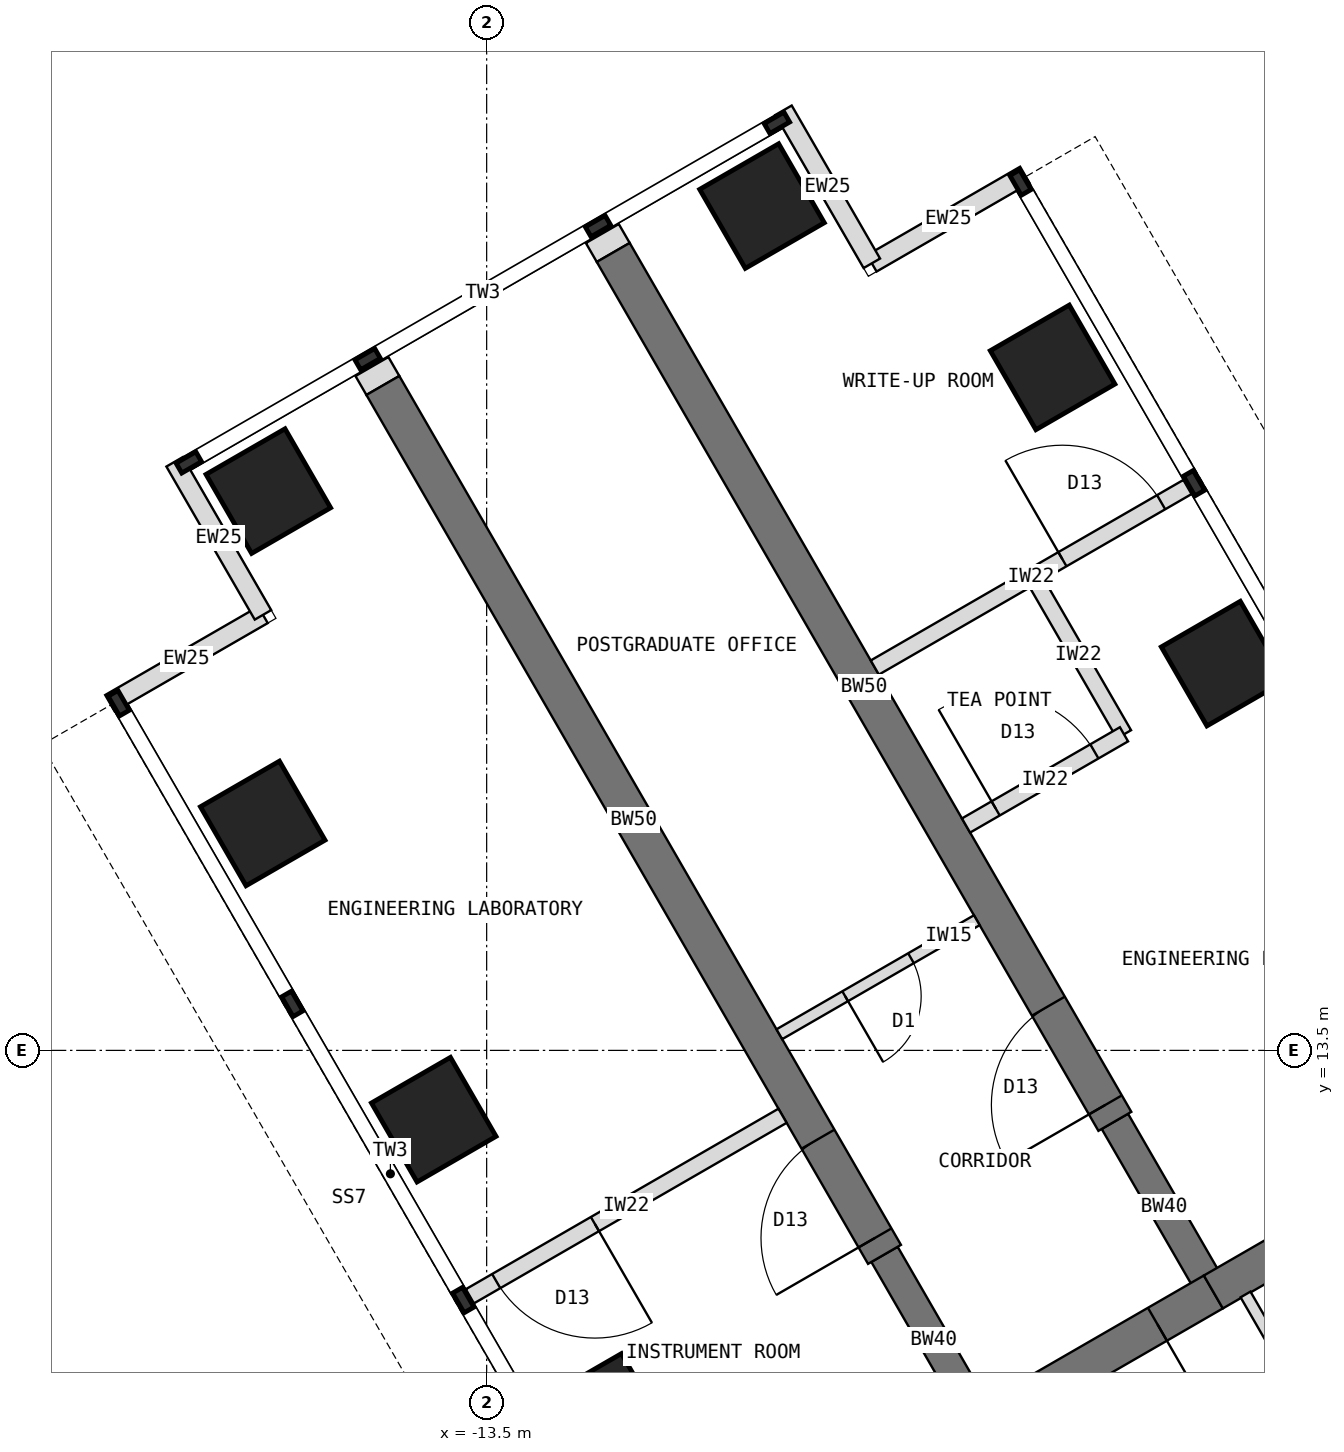
"""IFC4 building model, lengths in metres.
Left out: names, types, materials, properties, quantities, classifications, styles, units other than length and angle.
Written with IfcOpenShell. Run it as: python <this file> out.ifc"""

import sys

from ifc_helpers import new_model, si_unit, direction, frame, frame_2d, origin, origin_2d, place, context, subcontext, project, spatial, rectangle, extrude, element, fill, save


model = new_model("IFC4")
c1 = context("Model", 3, precision=1e-05, world=origin(), true_north=direction((0.0, 1.0)))
c2 = subcontext(c1, "Body", "Model", "MODEL_VIEW")
j1 = project(units=[si_unit("LENGTHUNIT", "METRE"), si_unit("PLANEANGLEUNIT", "RADIAN")], contexts=[c1])
p1 = place(None, origin())
s1 = spatial("IfcSite", under=j1, at=p1, CompositionType="ELEMENT")
p2 = place(p1, origin())
s2 = spatial("IfcBuilding", under=s1, at=p2, CompositionType="ELEMENT")
p3 = place(p2, frame((0.0, 0.0, 186.5)))
s3 = spatial("IfcBuildingStorey", under=s2, at=p3, CompositionType="ELEMENT", Elevation=186.5)
p4 = place(p3, frame((0.0, 12.596, 0.0), z_axis=(0.0, 0.0, 1.0), x_axis=(-0.866011268655, -0.500024481964, 0.0)))
e1 = element("IfcWall", 1, at=p4, inside=s3, PredefinedType="SHEAR", context=c2, shape_type="SweptSolid", body=[
    extrude(rectangle(XDim=4.548, YDim=0.5, at=frame_2d((2.274, 0.0))), origin(), (0.0, 0.0, 1.0), 4.0),
])
p5 = place(p3, frame((-3.939, 10.322, 0.0), z_axis=(0.0, 0.0, 1.0), x_axis=(-0.866019471182, -0.500010275428, 0.0)))
e2 = element("IfcWall", 2, at=p5, inside=s3, PredefinedType="SHEAR", context=c2, shape_type="SweptSolid", body=[
    extrude(rectangle(XDim=3.5, YDim=0.5, at=frame_2d((1.75, 0.0))), origin(), (0.0, 0.0, 1.0), 4.0),
])
p6 = place(p5, frame((0.85, 0.0, 0.0)))
e3 = element("IfcOpeningElement", 3, at=p6, cuts=e2, PredefinedType="OPENING", context=c2, shape_type="SweptSolid", body=[
    extrude(rectangle(XDim=1.8, YDim=2.1, at=frame_2d((0.9, 1.05))), frame((0.0, 0.26, 0.0), z_axis=(0.0, -1.0, 0.0), x_axis=(1.0, 0.0, 0.0)), (0.0, 0.0, 1.0), 0.52),
])
p7 = place(p3, frame((-6.97, 8.572, 0.0), z_axis=(0.0, 0.0, 1.0), x_axis=(-0.499988811324, 0.866031863473, 0.0)))
e4 = element("IfcWall", 4, at=p7, inside=s3, PredefinedType="SHEAR", context=c2, shape_type="SweptSolid", body=[
    extrude(rectangle(XDim=2.592, YDim=0.4, at=frame_2d((1.296, 0.0))), origin(), (0.0, 0.0, 1.0), 4.0),
])
p8 = place(p3, frame((-8.266, 10.816, 0.0), z_axis=(0.0, 0.0, 1.0), x_axis=(-0.499996231654, 0.866027579429, 0.0)))
e5 = element("IfcWall", 5, at=p8, inside=s3, PredefinedType="SHEAR", context=c2, shape_type="SweptSolid", body=[
    extrude(rectangle(XDim=13.2, YDim=0.5, at=frame_2d((6.6, 0.0))), origin(), (0.0, 0.0, 1.0), 4.0),
])
p9 = place(p8, frame((0.25, 0.0, 0.0)))
e6 = element("IfcOpeningElement", 6, at=p9, cuts=e5, PredefinedType="OPENING", context=c2, shape_type="SweptSolid", body=[
    extrude(rectangle(XDim=1.5, YDim=2.1, at=frame_2d((0.75, 1.05))), frame((0.0, 0.26, 0.0), z_axis=(0.0, -1.0, 0.0), x_axis=(1.0, 0.0, 0.0)), (0.0, 0.0, 1.0), 0.52),
])
p10 = place(p3, frame((-3.939, 10.322, 0.0), z_axis=(0.0, 0.0, 1.0), x_axis=(-0.499918158782, 0.866072649678, 0.0)))
e7 = element("IfcWall", 7, at=p10, inside=s3, PredefinedType="SHEAR", context=c2, shape_type="SweptSolid", body=[
    extrude(rectangle(XDim=2.592, YDim=0.4, at=frame_2d((1.296, 0.0))), origin(), (0.0, 0.0, 1.0), 4.0),
])
p11 = place(p3, frame((-5.234, 12.566, 0.0), z_axis=(0.0, 0.0, 1.0), x_axis=(-0.500010103361, 0.866019570528, 0.0)))
e8 = element("IfcWall", 8, at=p11, inside=s3, PredefinedType="SHEAR", context=c2, shape_type="SweptSolid", body=[
    extrude(rectangle(XDim=13.2, YDim=0.5, at=frame_2d((6.6, 0.0))), origin(), (0.0, 0.0, 1.0), 4.0),
])
p12 = place(p11, frame((0.25, 0.0, 0.0)))
e9 = element("IfcOpeningElement", 9, at=p12, cuts=e8, PredefinedType="OPENING", context=c2, shape_type="SweptSolid", body=[
    extrude(rectangle(XDim=1.5, YDim=2.1, at=frame_2d((0.75, 1.05))), frame((0.0, 0.26, 0.0), z_axis=(0.0, -1.0, 0.0), x_axis=(1.0, 0.0, 0.0)), (0.0, 0.0, 1.0), 0.52),
])
for number, where, z_axis, x_axis in (
    (10, (-11.946, 8.691, 0.0), (0.0, 0.0, 1.0), (0.866, 0.5, 0.0)),
    (11, (-14.196, 12.588, 0.0), (0.0, 0.0, 1.0), (0.866, 0.5, 0.0)),
    (12, (-3.804, 18.588, 0.0), (0.0, 0.0, 1.0), (0.866, 0.5, 0.0)),
    (13, (-16.446, 16.486, 0.0), (0.0, 0.0, 1.0), (0.866, 0.5, 0.0)),
    (14, (-6.054, 22.486, 0.0), (0.0, 0.0, 1.0), (0.866, 0.5, 0.0)),
    (15, (-16.373, 20.858, 0.0), (0.0, 0.0, 1.0), (0.866, 0.5, 0.0)),
    (16, (-9.877, 24.608, 0.0), (0.0, 0.0, 1.0), (0.866, 0.5, 0.0)),
):
    element("IfcColumn", number, at=place(p3, frame(where, z_axis=z_axis, x_axis=x_axis)), inside=s3, PredefinedType="COLUMN", context=c2, shape_type="SweptSolid", body=[
        extrude(rectangle(XDim=1.2, YDim=1.2, at=origin_2d()), origin(), (0.0, 0.0, 1.0), 4.0),
    ])
for number, where, z_axis, x_axis in (
    (17, (-18.456, 18.067, 0.0), (0.0, 0.0, 1.0), (0.866, 0.5, 0.0)),
    (18, (-16.443, 19.23, 0.0), (0.0, 0.0, 1.0), (-0.5, 0.866, 0.0)),
    (19, (-6.419, 25.017, 0.0), (0.0, 0.0, 1.0), (-0.866, -0.5, 0.0)),
    (20, (-8.432, 23.855, 0.0), (0.0, 0.0, 1.0), (-0.5, 0.866, 0.0)),
):
    element("IfcWall", number, at=place(p3, frame(where, z_axis=z_axis, x_axis=x_axis)), inside=s3, PredefinedType="STANDARD", context=c2, shape_type="SweptSolid", body=[
        extrude(rectangle(XDim=2.325, YDim=0.25, at=frame_2d((1.163, 0.0))), origin(), (0.0, 0.0, 1.0), 3.8),
    ])
for number, where, z_axis, x_axis in (
    (21, (-14.865, 22.248, 0.0), (0.0, 0.0, 1.0), (-0.5, 0.866, 0.0)),
    (22, (-11.834, 23.998, 0.0), (0.0, 0.0, 1.0), (-0.5, 0.866, 0.0)),
):
    element("IfcWall", number, at=place(p3, frame(where, z_axis=z_axis, x_axis=x_axis)), inside=s3, PredefinedType="PARTITIONING", context=c2, shape_type="SweptSolid", body=[
        extrude(rectangle(XDim=0.288, YDim=0.5, at=frame_2d((0.144, 0.0))), origin(), (0.0, 0.0, 1.0), 3.8),
    ])
p13 = place(p3, frame((-9.607, 12.64, 0.0), z_axis=(0.0, 0.0, 1.0), x_axis=(-0.866033238375, -0.499986429846, 0.0)))
e23 = element("IfcWall", 23, at=p13, inside=s3, PredefinedType="PARTITIONING", context=c2, shape_type="SweptSolid", body=[
    extrude(rectangle(XDim=4.75, YDim=0.215, at=frame_2d((2.375, 0.0))), origin(), (0.0, 0.0, 1.0), 3.8),
])
p14 = place(p13, frame((2.85, 0.0, 0.0)))
e24 = element("IfcOpeningElement", 24, at=p14, cuts=e23, PredefinedType="OPENING", context=c2, shape_type="SweptSolid", body=[
    extrude(rectangle(XDim=1.5, YDim=2.1, at=frame_2d((0.75, 1.05))), frame((0.0, 0.117, 0.0), z_axis=(0.0, -1.0, 0.0), x_axis=(1.0, 0.0, 0.0)), (0.0, 0.0, 1.0), 0.235),
])
p15 = place(p3, frame((-8.393, 18.537, 0.0), z_axis=(0.0, 0.0, 1.0), x_axis=(0.866033238375, 0.499986429846, 0.0)))
e25 = element("IfcWall", 25, at=p15, inside=s3, PredefinedType="PARTITIONING", context=c2, shape_type="SweptSolid", body=[
    extrude(rectangle(XDim=4.75, YDim=0.215, at=frame_2d((2.375, 0.0))), origin(), (0.0, 0.0, 1.0), 3.8),
])
p16 = place(p15, frame((2.85, 0.0, 0.0)))
e26 = element("IfcOpeningElement", 26, at=p16, cuts=e25, PredefinedType="OPENING", context=c2, shape_type="SweptSolid", body=[
    extrude(rectangle(XDim=1.5, YDim=2.1, at=frame_2d((0.75, 1.05))), frame((0.0, 0.117, 0.0), z_axis=(0.0, -1.0, 0.0), x_axis=(1.0, 0.0, 0.0)), (0.0, 0.0, 1.0), 0.235),
])
p17 = place(p3, frame((-5.115, 17.658, 0.0), z_axis=(0.0, 0.0, 1.0), x_axis=(-0.499957262057, 0.866050077142, 0.0)))
e27 = element("IfcWall", 27, at=p17, inside=s3, PredefinedType="PARTITIONING", context=c2, shape_type="SweptSolid", body=[
    extrude(rectangle(XDim=2.4, YDim=0.215, at=frame_2d((1.2, 0.0))), origin(), (0.0, 0.0, 1.0), 3.8),
])
p18 = place(p3, frame((-7.193, 16.458, 0.0), z_axis=(0.0, 0.0, 1.0), x_axis=(0.866024647952, 0.500001309137, 0.0)))
e28 = element("IfcWall", 28, at=p18, inside=s3, PredefinedType="PARTITIONING", context=c2, shape_type="SweptSolid", body=[
    extrude(rectangle(XDim=2.4, YDim=0.215, at=frame_2d((1.2, 0.0))), origin(), (0.0, 0.0, 1.0), 3.8),
])
p19 = place(p18, frame((0.45, 0.0, 0.0)))
e29 = element("IfcOpeningElement", 29, at=p19, cuts=e28, PredefinedType="OPENING", context=c2, shape_type="SweptSolid", body=[
    extrude(rectangle(XDim=1.5, YDim=2.1, at=frame_2d((0.75, 1.05))), frame((0.0, 0.117, 0.0), z_axis=(0.0, -1.0, 0.0), x_axis=(1.0, 0.0, 0.0)), (0.0, 0.0, 1.0), 0.235),
])
p20 = place(p3, frame((-3.515, 10.289, 0.0), z_axis=(0.0, 0.0, 1.0), x_axis=(0.499968392031, -0.866043651885, 0.0)))
e30 = element("IfcWall", 30, at=p20, inside=s3, PredefinedType="PARTITIONING", context=c2, shape_type="SweptSolid", body=[
    extrude(rectangle(XDim=4.526, YDim=0.15, at=frame_2d((2.263, 0.0))), origin(), (0.0, 0.0, 1.0), 3.8),
])
p21 = place(p20, frame((2.668, 0.0, 0.0)))
e31 = element("IfcOpeningElement", 31, at=p21, cuts=e30, PredefinedType="OPENING", context=c2, shape_type="SweptSolid", body=[
    extrude(rectangle(XDim=1.0, YDim=2.1, at=frame_2d((0.5, 1.05))), frame((0.0, 0.085, 0.0), z_axis=(0.0, -1.0, 0.0), x_axis=(1.0, 0.0, 0.0)), (0.0, 0.0, 1.0), 0.17),
])
p22 = place(p3, frame((-7.051, 15.213, 0.0), z_axis=(0.0, 0.0, 1.0), x_axis=(-0.866010750942, -0.50002537861, 0.0)))
e32 = element("IfcWall", 32, at=p22, inside=s3, PredefinedType="PARTITIONING", context=c2, shape_type="SweptSolid", body=[
    extrude(rectangle(XDim=3.0, YDim=0.15, at=frame_2d((1.5, 0.0))), origin(), (0.0, 0.0, 1.0), 3.8),
])
p23 = place(p22, frame((1.0, 0.0, 0.0)))
e33 = element("IfcOpeningElement", 33, at=p23, cuts=e32, PredefinedType="OPENING", context=c2, shape_type="SweptSolid", body=[
    extrude(rectangle(XDim=1.0, YDim=2.1, at=frame_2d((0.5, 1.05))), frame((0.0, 0.085, 0.0), z_axis=(0.0, -1.0, 0.0), x_axis=(1.0, 0.0, 0.0)), (0.0, 0.0, 1.0), 0.17),
])
p24 = place(p6, origin())
e34 = element("IfcDoor", 34, at=p24, inside=s3, OperationType="DOUBLE_DOOR_DOUBLE_SWING", PredefinedType="DOOR", context=c2, shape_type="SweptSolid", body=[
    extrude(rectangle(XDim=1.8, YDim=2.1, at=frame_2d((0.9, 1.05))), frame((0.0, 0.025, 0.0), z_axis=(0.0, -1.0, 0.0), x_axis=(1.0, 0.0, 0.0)), (0.0, 0.0, 1.0), 0.05),
])
fill(e3, e34)
p25 = place(p14, origin())
e35 = element("IfcDoor", 35, at=p25, inside=s3, OperationType="DOUBLE_DOOR_SINGLE_SWING", PredefinedType="DOOR", context=c2, shape_type="SweptSolid", body=[
    extrude(rectangle(XDim=1.5, YDim=2.1, at=frame_2d((0.75, 1.05))), frame((0.0, 0.025, 0.0), z_axis=(0.0, -1.0, 0.0), x_axis=(1.0, 0.0, 0.0)), (0.0, 0.0, 1.0), 0.05),
])
fill(e24, e35)
p26 = place(p16, origin())
e36 = element("IfcDoor", 36, at=p26, inside=s3, OperationType="DOUBLE_DOOR_SINGLE_SWING", PredefinedType="DOOR", context=c2, shape_type="SweptSolid", body=[
    extrude(rectangle(XDim=1.5, YDim=2.1, at=frame_2d((0.75, 1.05))), frame((0.0, 0.025, 0.0), z_axis=(0.0, -1.0, 0.0), x_axis=(1.0, 0.0, 0.0)), (0.0, 0.0, 1.0), 0.05),
])
fill(e26, e36)
p27 = place(p19, origin())
e37 = element("IfcDoor", 37, at=p27, inside=s3, OperationType="DOUBLE_DOOR_SINGLE_SWING", PredefinedType="DOOR", context=c2, shape_type="SweptSolid", body=[
    extrude(rectangle(XDim=1.5, YDim=2.1, at=frame_2d((0.75, 1.05))), frame((0.0, 0.025, 0.0), z_axis=(0.0, -1.0, 0.0), x_axis=(1.0, 0.0, 0.0)), (0.0, 0.0, 1.0), 0.05),
])
fill(e29, e37)
p28 = place(p23, origin())
e38 = element("IfcDoor", 38, at=p28, inside=s3, OperationType="SINGLE_SWING_RIGHT", PredefinedType="DOOR", context=c2, shape_type="SweptSolid", body=[
    extrude(rectangle(XDim=1.0, YDim=2.1, at=frame_2d((0.5, 1.05))), frame((0.0, 0.025, 0.0), z_axis=(0.0, -1.0, 0.0), x_axis=(1.0, 0.0, 0.0)), (0.0, 0.0, 1.0), 0.05),
])
fill(e33, e38)
p29 = place(p9, origin())
e39 = element("IfcDoor", 39, at=p29, inside=s3, OperationType="DOUBLE_DOOR_SINGLE_SWING", PredefinedType="DOOR", context=c2, shape_type="SweptSolid", body=[
    extrude(rectangle(XDim=1.5, YDim=2.1, at=frame_2d((0.75, 1.05))), frame((0.0, 0.025, 0.0), z_axis=(0.0, -1.0, 0.0), x_axis=(1.0, 0.0, 0.0)), (0.0, 0.0, 1.0), 0.05),
])
fill(e6, e39)
p30 = place(p12, origin())
e40 = element("IfcDoor", 40, at=p30, inside=s3, OperationType="DOUBLE_DOOR_SINGLE_SWING", PredefinedType="DOOR", context=c2, shape_type="SweptSolid", body=[
    extrude(rectangle(XDim=1.5, YDim=2.1, at=frame_2d((0.75, 1.05))), frame((0.0, 0.025, 0.0), z_axis=(0.0, -1.0, 0.0), x_axis=(1.0, 0.0, 0.0)), (0.0, 0.0, 1.0), 0.05),
])
fill(e9, e40)
save(model, sys.argv[1])
